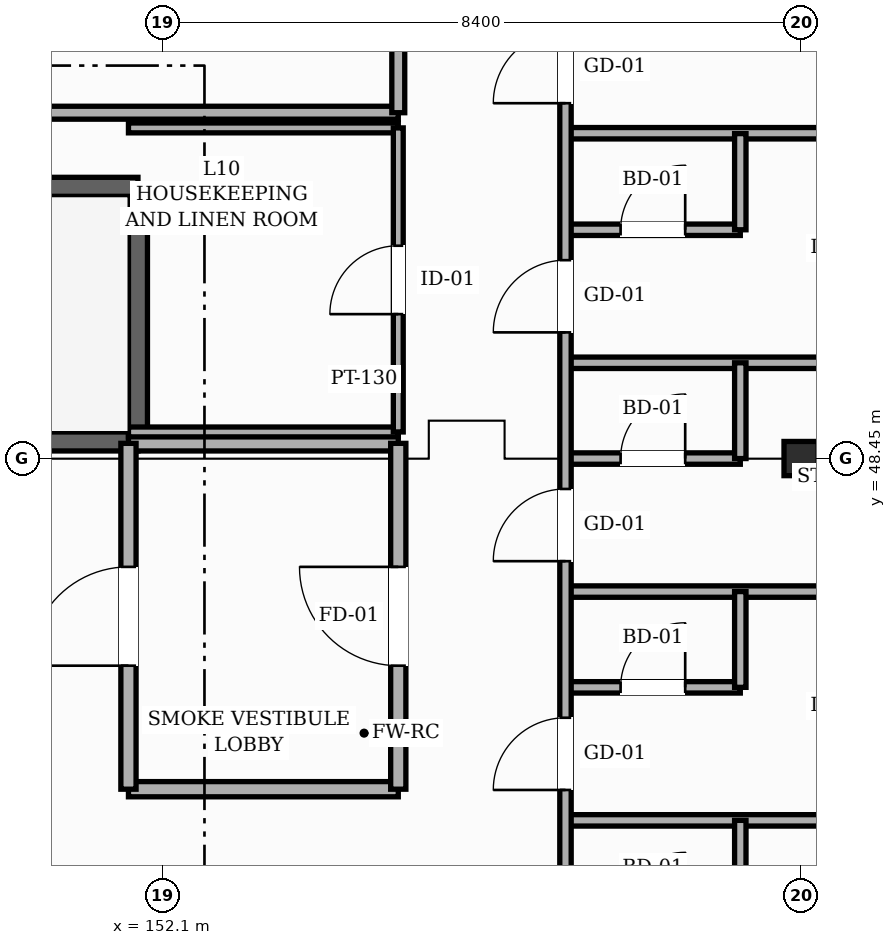
"""IFC4 building model, lengths in metres.
Left out: names, types, materials, properties, quantities, classifications, styles, units other than length and angle.
Written with IfcOpenShell. Run it as: python <this file> out.ifc"""

import sys

from ifc_helpers import new_model, si_unit, direction, frame, frame_2d, origin, origin_2d, place, context, subcontext, project, spatial, rectangle, hollow_rectangle, extrude, element, fill, save


model = new_model("IFC4")
c1 = context("Model", 3, precision=1e-05, world=origin(), true_north=direction((0.0, 1.0)))
c2 = subcontext(c1, "Body", "Model", "MODEL_VIEW")
j1 = project(units=[si_unit("LENGTHUNIT", "METRE"), si_unit("PLANEANGLEUNIT", "RADIAN")], contexts=[c1])
p1 = place(None, origin())
s1 = spatial("IfcSite", under=j1, at=p1, CompositionType="ELEMENT")
p2 = place(p1, origin())
s2 = spatial("IfcBuilding", under=s1, at=p2, CompositionType="ELEMENT")
p3 = place(p2, frame((0.0, 0.0, 42.6)))
s3 = spatial("IfcBuildingStorey", under=s2, at=p3, CompositionType="ELEMENT", Elevation=42.6)
p4 = place(p3, frame((160.5, 48.45, 0.0), z_axis=(0.0, 0.0, 1.0), x_axis=(1.0, 0.0, 0.0)))
e1 = element("IfcColumn", 1, at=p4, inside=s3, PredefinedType="COLUMN", context=c2, shape_type="SweptSolid", body=[
    extrude(hollow_rectangle(XDim=0.45, YDim=0.45, WallThickness=0.019, InnerFilletRadius=0.019, OuterFilletRadius=0.038, at=origin_2d()), origin(), (0.0, 0.0, 1.0), 3.6),
])
p5 = place(p3, frame((151.775, 52.025, 0.0), z_axis=(0.0, 0.0, 1.0), x_axis=(0.0, -1.0, 0.0)))
e2 = element("IfcWall", 2, at=p5, inside=s3, PredefinedType="SHEAR", context=c2, shape_type="SweptSolid", body=[
    extrude(rectangle(XDim=3.35, YDim=0.25, at=frame_2d((1.675, 0.0))), origin(), (0.0, 0.0, 1.0), 3.38),
])
p6 = place(p3, frame((151.775, 48.675, 0.0), z_axis=(0.0, 0.0, 1.0), x_axis=(-1.0, 0.0, 0.0)))
e3 = element("IfcWall", 3, at=p6, inside=s3, PredefinedType="SHEAR", context=c2, shape_type="SweptSolid", body=[
    extrude(rectangle(XDim=7.9, YDim=0.25, at=frame_2d((3.95, 0.0))), origin(), (0.0, 0.0, 1.0), 3.38),
])
p7 = place(p6, frame((6.075, 0.0, 0.0)))
e4 = element("IfcOpeningElement", 4, at=p7, cuts=e3, PredefinedType="OPENING", context=c2, shape_type="SweptSolid", body=[
    extrude(rectangle(XDim=1.3, YDim=2.2, at=frame_2d((0.65, 1.1))), frame((0.0, 0.135, 0.0), z_axis=(0.0, -1.0, 0.0), x_axis=(1.0, 0.0, 0.0)), (0.0, 0.0, 1.0), 0.27),
])
p8 = place(p3, frame((143.875, 52.025, 0.0), z_axis=(0.0, 0.0, 1.0), x_axis=(1.0, 0.0, 0.0)))
e5 = element("IfcWall", 5, at=p8, inside=s3, PredefinedType="SHEAR", context=c2, shape_type="SweptSolid", body=[
    extrude(rectangle(XDim=7.9, YDim=0.25, at=frame_2d((3.95, 0.0))), origin(), (0.0, 0.0, 1.0), 3.38),
])
p9 = place(p3, frame((157.4, 43.69, 0.0), z_axis=(0.0, 0.0, 1.0), x_axis=(1.0, 0.0, 0.0)))
e6 = element("IfcWall", 6, at=p9, inside=s3, PredefinedType="PARTITIONING", context=c2, shape_type="SweptSolid", body=[
    extrude(rectangle(XDim=9.8, YDim=0.15, at=frame_2d((4.9, 0.0))), origin(), (0.0, 0.0, 1.0), 3.365),
])
p10 = place(p3, frame((151.65, 44.1, 0.0), z_axis=(0.0, 0.0, 1.0), x_axis=(1.0, 0.0, 0.0)))
e7 = element("IfcWall", 7, at=p10, inside=s3, PredefinedType="SOLIDWALL", context=c2, shape_type="SweptSolid", body=[
    extrude(rectangle(XDim=3.55, YDim=0.2, at=frame_2d((1.775, 0.0))), origin(), (0.0, 0.0, 1.0), 3.365),
])
p11 = place(p3, frame((157.4, 45.44, 0.0), z_axis=(0.0, 0.0, 1.0), x_axis=(1.0, 0.0, 0.0)))
e8 = element("IfcWall", 8, at=p11, inside=s3, PredefinedType="PARTITIONING", context=c2, shape_type="SweptSolid", body=[
    extrude(rectangle(XDim=2.3, YDim=0.15, at=frame_2d((1.15, 0.0))), origin(), (0.0, 0.0, 1.0), 3.365),
])
p12 = place(p11, frame((0.725, 0.0, 0.0)))
e9 = element("IfcOpeningElement", 9, at=p12, cuts=e8, PredefinedType="OPENING", context=c2, shape_type="SweptSolid", body=[
    extrude(rectangle(XDim=0.85, YDim=2.1, at=frame_2d((0.425, 1.05))), frame((0.0, 0.085, 0.0), z_axis=(0.0, -1.0, 0.0), x_axis=(1.0, 0.0, 0.0)), (0.0, 0.0, 1.0), 0.17),
])
p13 = place(p3, frame((157.4, 46.7, 0.0), z_axis=(0.0, 0.0, 1.0), x_axis=(1.0, 0.0, 0.0)))
e10 = element("IfcWall", 10, at=p13, inside=s3, PredefinedType="PARTITIONING", context=c2, shape_type="SweptSolid", body=[
    extrude(rectangle(XDim=9.8, YDim=0.15, at=frame_2d((4.9, 0.0))), origin(), (0.0, 0.0, 1.0), 3.365),
])
p14 = place(p3, frame((157.4, 48.45, 0.0), z_axis=(0.0, 0.0, 1.0), x_axis=(1.0, 0.0, 0.0)))
e11 = element("IfcWall", 11, at=p14, inside=s3, PredefinedType="PARTITIONING", context=c2, shape_type="SweptSolid", body=[
    extrude(rectangle(XDim=2.3, YDim=0.15, at=frame_2d((1.15, 0.0))), origin(), (0.0, 0.0, 1.0), 3.365),
])
p15 = place(p14, frame((0.725, 0.0, 0.0)))
e12 = element("IfcOpeningElement", 12, at=p15, cuts=e11, PredefinedType="OPENING", context=c2, shape_type="SweptSolid", body=[
    extrude(rectangle(XDim=0.85, YDim=2.1, at=frame_2d((0.425, 1.05))), frame((0.0, 0.085, 0.0), z_axis=(0.0, -1.0, 0.0), x_axis=(1.0, 0.0, 0.0)), (0.0, 0.0, 1.0), 0.17),
])
p16 = place(p3, frame((151.65, 48.65, 0.0), z_axis=(0.0, 0.0, 1.0), x_axis=(1.0, 0.0, 0.0)))
e13 = element("IfcWall", 13, at=p16, inside=s3, PredefinedType="SOLIDWALL", context=c2, shape_type="SweptSolid", body=[
    extrude(rectangle(XDim=3.55, YDim=0.2, at=frame_2d((1.775, 0.0))), origin(), (0.0, 0.0, 1.0), 3.365),
])
p17 = place(p3, frame((151.65, 48.8, 0.0), z_axis=(0.0, 0.0, 1.0), x_axis=(1.0, 0.0, 0.0)))
e14 = element("IfcWall", 14, at=p17, inside=s3, PredefinedType="PARTITIONING", context=c2, shape_type="SweptSolid", body=[
    extrude(rectangle(XDim=3.55, YDim=0.13, at=frame_2d((1.775, 0.0))), origin(), (0.0, 0.0, 1.0), 3.365),
])
p18 = place(p3, frame((157.4, 49.71, 0.0), z_axis=(0.0, 0.0, 1.0), x_axis=(1.0, 0.0, 0.0)))
e15 = element("IfcWall", 15, at=p18, inside=s3, PredefinedType="PARTITIONING", context=c2, shape_type="SweptSolid", body=[
    extrude(rectangle(XDim=9.8, YDim=0.15, at=frame_2d((4.9, 0.0))), origin(), (0.0, 0.0, 1.0), 3.365),
])
p19 = place(p3, frame((157.4, 51.46, 0.0), z_axis=(0.0, 0.0, 1.0), x_axis=(1.0, 0.0, 0.0)))
e16 = element("IfcWall", 16, at=p19, inside=s3, PredefinedType="PARTITIONING", context=c2, shape_type="SweptSolid", body=[
    extrude(rectangle(XDim=2.3, YDim=0.15, at=frame_2d((1.15, 0.0))), origin(), (0.0, 0.0, 1.0), 3.365),
])
p20 = place(p19, frame((0.725, 0.0, 0.0)))
e17 = element("IfcOpeningElement", 17, at=p20, cuts=e16, PredefinedType="OPENING", context=c2, shape_type="SweptSolid", body=[
    extrude(rectangle(XDim=0.85, YDim=2.1, at=frame_2d((0.425, 1.05))), frame((0.0, 0.085, 0.0), z_axis=(0.0, -1.0, 0.0), x_axis=(1.0, 0.0, 0.0)), (0.0, 0.0, 1.0), 0.17),
])
p21 = place(p3, frame((157.4, 52.73, 0.0), z_axis=(0.0, 0.0, 1.0), x_axis=(1.0, 0.0, 0.0)))
e18 = element("IfcWall", 18, at=p21, inside=s3, PredefinedType="PARTITIONING", context=c2, shape_type="SweptSolid", body=[
    extrude(rectangle(XDim=9.8, YDim=0.15, at=frame_2d((4.9, 0.0))), origin(), (0.0, 0.0, 1.0), 3.105),
])
p22 = place(p3, frame((151.65, 52.8, 0.0), z_axis=(0.0, 0.0, 1.0), x_axis=(1.0, 0.0, 0.0)))
e19 = element("IfcWall", 19, at=p22, inside=s3, PredefinedType="PARTITIONING", context=c2, shape_type="SweptSolid", body=[
    extrude(rectangle(XDim=3.55, YDim=0.13, at=frame_2d((1.775, 0.0))), origin(), (0.0, 0.0, 1.0), 3.365),
])
p23 = place(p3, frame((144.8, 53.0, 0.0), z_axis=(0.0, 0.0, 1.0), x_axis=(1.0, 0.0, 0.0)))
e20 = element("IfcWall", 20, at=p23, inside=s3, PredefinedType="PARTITIONING", context=c2, shape_type="SweptSolid", body=[
    extrude(rectangle(XDim=10.4, YDim=0.17, at=frame_2d((5.2, 0.0))), origin(), (0.0, 0.0, 1.0), 3.365),
])
p24 = place(p3, frame((151.65, 44.1, 0.0), z_axis=(0.0, 0.0, 1.0), x_axis=(0.0, 1.0, 0.0)))
e21 = element("IfcWall", 21, at=p24, inside=s3, PredefinedType="SOLIDWALL", context=c2, shape_type="SweptSolid", body=[
    extrude(rectangle(XDim=4.55, YDim=0.2, at=frame_2d((2.275, 0.0))), origin(), (0.0, 0.0, 1.0), 3.365),
])
p25 = place(p24, frame((1.625, 0.0, 0.0)))
e22 = element("IfcOpeningElement", 22, at=p25, cuts=e21, PredefinedType="OPENING", context=c2, shape_type="SweptSolid", body=[
    extrude(rectangle(XDim=1.3, YDim=2.2, at=frame_2d((0.65, 1.1))), frame((0.0, 0.11, 0.0), z_axis=(0.0, -1.0, 0.0), x_axis=(1.0, 0.0, 0.0)), (0.0, 0.0, 1.0), 0.22),
])
p26 = place(p3, frame((155.2, 44.1, 0.0), z_axis=(0.0, 0.0, 1.0), x_axis=(0.0, 1.0, 0.0)))
e23 = element("IfcWall", 23, at=p26, inside=s3, PredefinedType="SOLIDWALL", context=c2, shape_type="SweptSolid", body=[
    extrude(rectangle(XDim=4.55, YDim=0.2, at=frame_2d((2.275, 0.0))), origin(), (0.0, 0.0, 1.0), 3.365),
])
p27 = place(p26, frame((1.625, 0.0, 0.0)))
e24 = element("IfcOpeningElement", 24, at=p27, cuts=e23, PredefinedType="OPENING", context=c2, shape_type="SweptSolid", body=[
    extrude(rectangle(XDim=1.3, YDim=2.2, at=frame_2d((0.65, 1.1))), frame((0.0, 0.11, 0.0), z_axis=(0.0, -1.0, 0.0), x_axis=(1.0, 0.0, 0.0)), (0.0, 0.0, 1.0), 0.22),
])
p28 = place(p3, frame((155.2, 48.8, 0.0), z_axis=(0.0, 0.0, 1.0), x_axis=(0.0, 1.0, 0.0)))
e25 = element("IfcWall", 25, at=p28, inside=s3, PredefinedType="PARTITIONING", context=c2, shape_type="SweptSolid", body=[
    extrude(rectangle(XDim=4.0, YDim=0.13, at=frame_2d((2.0, 0.0))), origin(), (0.0, 0.0, 1.0), 3.365),
])
p29 = place(p28, frame((1.55, 0.0, 0.0)))
e26 = element("IfcOpeningElement", 26, at=p29, cuts=e25, PredefinedType="OPENING", context=c2, shape_type="SweptSolid", body=[
    extrude(rectangle(XDim=0.9, YDim=2.15, at=frame_2d((0.45, 1.075))), frame((0.0, 0.075, 0.0), z_axis=(0.0, -1.0, 0.0), x_axis=(1.0, 0.0, 0.0)), (0.0, 0.0, 1.0), 0.15),
])
p30 = place(p3, frame((155.2, 53.0, 0.0), z_axis=(0.0, 0.0, 1.0), x_axis=(0.0, 1.0, 0.0)))
e27 = element("IfcWall", 27, at=p30, inside=s3, PredefinedType="PARTITIONING", context=c2, shape_type="SweptSolid", body=[
    extrude(rectangle(XDim=6.45, YDim=0.17, at=frame_2d((3.225, 0.0))), origin(), (0.0, 0.0, 1.0), 3.365),
])
p31 = place(p30, frame((2.625, 0.0, 0.0)))
e28 = element("IfcOpeningElement", 28, at=p31, cuts=e27, PredefinedType="OPENING", context=c2, shape_type="SweptSolid", body=[
    extrude(rectangle(XDim=1.2, YDim=2.2, at=frame_2d((0.6, 1.1))), frame((0.0, 0.095, 0.0), z_axis=(0.0, -1.0, 0.0), x_axis=(1.0, 0.0, 0.0)), (0.0, 0.0, 1.0), 0.19),
])
p32 = place(p3, frame((157.4, 22.6, 0.0), z_axis=(0.0, 0.0, 1.0), x_axis=(0.0, 1.0, 0.0)))
e29 = element("IfcWall", 29, at=p32, inside=s3, PredefinedType="PARTITIONING", context=c2, shape_type="SweptSolid", body=[
    extrude(rectangle(XDim=48.2, YDim=0.15, at=frame_2d((24.1, 0.0))), origin(), (0.0, 0.0, 1.0), 3.365),
])
p33 = place(p32, frame((0.325, 0.0, 0.0)))
e30 = element("IfcOpeningElement", 30, at=p33, cuts=e29, PredefinedType="OPENING", context=c2, shape_type="SweptSolid", body=[
    extrude(rectangle(XDim=1.1, YDim=2.2, at=frame_2d((0.55, 1.1))), frame((0.0, 0.085, 0.0), z_axis=(0.0, -1.0, 0.0), x_axis=(1.0, 0.0, 0.0)), (0.0, 0.0, 1.0), 0.17),
])
p34 = place(p32, frame((3.41, 0.0, 0.0)))
e31 = element("IfcOpeningElement", 31, at=p34, cuts=e29, PredefinedType="OPENING", context=c2, shape_type="SweptSolid", body=[
    extrude(rectangle(XDim=0.95, YDim=2.15, at=frame_2d((0.475, 1.075))), frame((0.0, 0.085, 0.0), z_axis=(0.0, -1.0, 0.0), x_axis=(1.0, 0.0, 0.0)), (0.0, 0.0, 1.0), 0.17),
])
p35 = place(p32, frame((6.425, 0.0, 0.0)))
e32 = element("IfcOpeningElement", 32, at=p35, cuts=e29, PredefinedType="OPENING", context=c2, shape_type="SweptSolid", body=[
    extrude(rectangle(XDim=0.95, YDim=2.15, at=frame_2d((0.475, 1.075))), frame((0.0, 0.085, 0.0), z_axis=(0.0, -1.0, 0.0), x_axis=(1.0, 0.0, 0.0)), (0.0, 0.0, 1.0), 0.17),
])
p36 = place(p32, frame((9.44, 0.0, 0.0)))
e33 = element("IfcOpeningElement", 33, at=p36, cuts=e29, PredefinedType="OPENING", context=c2, shape_type="SweptSolid", body=[
    extrude(rectangle(XDim=0.95, YDim=2.15, at=frame_2d((0.475, 1.075))), frame((0.0, 0.085, 0.0), z_axis=(0.0, -1.0, 0.0), x_axis=(1.0, 0.0, 0.0)), (0.0, 0.0, 1.0), 0.17),
])
p37 = place(p32, frame((12.45, 0.0, 0.0)))
e34 = element("IfcOpeningElement", 34, at=p37, cuts=e29, PredefinedType="OPENING", context=c2, shape_type="SweptSolid", body=[
    extrude(rectangle(XDim=0.95, YDim=2.15, at=frame_2d((0.475, 1.075))), frame((0.0, 0.085, 0.0), z_axis=(0.0, -1.0, 0.0), x_axis=(1.0, 0.0, 0.0)), (0.0, 0.0, 1.0), 0.17),
])
p38 = place(p32, frame((15.46, 0.0, 0.0)))
e35 = element("IfcOpeningElement", 35, at=p38, cuts=e29, PredefinedType="OPENING", context=c2, shape_type="SweptSolid", body=[
    extrude(rectangle(XDim=0.95, YDim=2.15, at=frame_2d((0.475, 1.075))), frame((0.0, 0.085, 0.0), z_axis=(0.0, -1.0, 0.0), x_axis=(1.0, 0.0, 0.0)), (0.0, 0.0, 1.0), 0.17),
])
p39 = place(p32, frame((18.475, 0.0, 0.0)))
e36 = element("IfcOpeningElement", 36, at=p39, cuts=e29, PredefinedType="OPENING", context=c2, shape_type="SweptSolid", body=[
    extrude(rectangle(XDim=0.95, YDim=2.15, at=frame_2d((0.475, 1.075))), frame((0.0, 0.085, 0.0), z_axis=(0.0, -1.0, 0.0), x_axis=(1.0, 0.0, 0.0)), (0.0, 0.0, 1.0), 0.17),
])
p40 = place(p32, frame((21.49, 0.0, 0.0)))
e37 = element("IfcOpeningElement", 37, at=p40, cuts=e29, PredefinedType="OPENING", context=c2, shape_type="SweptSolid", body=[
    extrude(rectangle(XDim=0.95, YDim=2.15, at=frame_2d((0.475, 1.075))), frame((0.0, 0.085, 0.0), z_axis=(0.0, -1.0, 0.0), x_axis=(1.0, 0.0, 0.0)), (0.0, 0.0, 1.0), 0.17),
])
p41 = place(p32, frame((24.5, 0.0, 0.0)))
e38 = element("IfcOpeningElement", 38, at=p41, cuts=e29, PredefinedType="OPENING", context=c2, shape_type="SweptSolid", body=[
    extrude(rectangle(XDim=0.95, YDim=2.15, at=frame_2d((0.475, 1.075))), frame((0.0, 0.085, 0.0), z_axis=(0.0, -1.0, 0.0), x_axis=(1.0, 0.0, 0.0)), (0.0, 0.0, 1.0), 0.17),
])
p42 = place(p32, frame((27.51, 0.0, 0.0)))
e39 = element("IfcOpeningElement", 39, at=p42, cuts=e29, PredefinedType="OPENING", context=c2, shape_type="SweptSolid", body=[
    extrude(rectangle(XDim=0.95, YDim=2.15, at=frame_2d((0.475, 1.075))), frame((0.0, 0.085, 0.0), z_axis=(0.0, -1.0, 0.0), x_axis=(1.0, 0.0, 0.0)), (0.0, 0.0, 1.0), 0.17),
])
p43 = place(p32, frame((30.525, 0.0, 0.0)))
e40 = element("IfcOpeningElement", 40, at=p43, cuts=e29, PredefinedType="OPENING", context=c2, shape_type="SweptSolid", body=[
    extrude(rectangle(XDim=0.95, YDim=2.15, at=frame_2d((0.475, 1.075))), frame((0.0, 0.085, 0.0), z_axis=(0.0, -1.0, 0.0), x_axis=(1.0, 0.0, 0.0)), (0.0, 0.0, 1.0), 0.17),
])
p44 = place(p32, frame((33.54, 0.0, 0.0)))
e41 = element("IfcOpeningElement", 41, at=p44, cuts=e29, PredefinedType="OPENING", context=c2, shape_type="SweptSolid", body=[
    extrude(rectangle(XDim=0.95, YDim=2.15, at=frame_2d((0.475, 1.075))), frame((0.0, 0.085, 0.0), z_axis=(0.0, -1.0, 0.0), x_axis=(1.0, 0.0, 0.0)), (0.0, 0.0, 1.0), 0.17),
])
p45 = place(p32, frame((36.55, 0.0, 0.0)))
e42 = element("IfcOpeningElement", 42, at=p45, cuts=e29, PredefinedType="OPENING", context=c2, shape_type="SweptSolid", body=[
    extrude(rectangle(XDim=0.95, YDim=2.15, at=frame_2d((0.475, 1.075))), frame((0.0, 0.085, 0.0), z_axis=(0.0, -1.0, 0.0), x_axis=(1.0, 0.0, 0.0)), (0.0, 0.0, 1.0), 0.17),
])
p46 = place(p32, frame((39.56, 0.0, 0.0)))
e43 = element("IfcOpeningElement", 43, at=p46, cuts=e29, PredefinedType="OPENING", context=c2, shape_type="SweptSolid", body=[
    extrude(rectangle(XDim=0.95, YDim=2.15, at=frame_2d((0.475, 1.075))), frame((0.0, 0.085, 0.0), z_axis=(0.0, -1.0, 0.0), x_axis=(1.0, 0.0, 0.0)), (0.0, 0.0, 1.0), 0.17),
])
p47 = place(p32, frame((42.575, 0.0, 0.0)))
e44 = element("IfcOpeningElement", 44, at=p47, cuts=e29, PredefinedType="OPENING", context=c2, shape_type="SweptSolid", body=[
    extrude(rectangle(XDim=0.95, YDim=2.15, at=frame_2d((0.475, 1.075))), frame((0.0, 0.085, 0.0), z_axis=(0.0, -1.0, 0.0), x_axis=(1.0, 0.0, 0.0)), (0.0, 0.0, 1.0), 0.17),
])
p48 = place(p32, frame((45.585, 0.0, 0.0)))
e45 = element("IfcOpeningElement", 45, at=p48, cuts=e29, PredefinedType="OPENING", context=c2, shape_type="SweptSolid", body=[
    extrude(rectangle(XDim=0.95, YDim=2.15, at=frame_2d((0.475, 1.075))), frame((0.0, 0.085, 0.0), z_axis=(0.0, -1.0, 0.0), x_axis=(1.0, 0.0, 0.0)), (0.0, 0.0, 1.0), 0.17),
])
p49 = place(p3, frame((159.7, 42.425, 0.0), z_axis=(0.0, 0.0, 1.0), x_axis=(0.0, 1.0, 0.0)))
e46 = element("IfcWall", 46, at=p49, inside=s3, PredefinedType="PARTITIONING", context=c2, shape_type="SweptSolid", body=[
    extrude(rectangle(XDim=1.265, YDim=0.15, at=frame_2d((0.632, 0.0))), origin(), (0.0, 0.0, 1.0), 3.365),
])
for number, where, z_axis, x_axis in (
    (47, (159.7, 45.44, 0.0), (0.0, 0.0, 1.0), (0.0, 1.0, 0.0)),
    (48, (159.7, 48.45, 0.0), (0.0, 0.0, 1.0), (0.0, 1.0, 0.0)),
):
    element("IfcWall", number, at=place(p3, frame(where, z_axis=z_axis, x_axis=x_axis)), inside=s3, PredefinedType="PARTITIONING", context=c2, shape_type="SweptSolid", body=[
        extrude(rectangle(XDim=1.26, YDim=0.15, at=frame_2d((0.63, 0.0))), origin(), (0.0, 0.0, 1.0), 3.365),
    ])
p50 = place(p3, frame((159.7, 51.46, 0.0), z_axis=(0.0, 0.0, 1.0), x_axis=(0.0, 1.0, 0.0)))
e49 = element("IfcWall", 49, at=p50, inside=s3, PredefinedType="PARTITIONING", context=c2, shape_type="SweptSolid", body=[
    extrude(rectangle(XDim=1.265, YDim=0.15, at=frame_2d((0.633, 0.0))), origin(), (0.0, 0.0, 1.0), 3.365),
])
p51 = place(p25, origin())
e50 = element("IfcDoor", 50, at=p51, inside=s3, OperationType="SINGLE_SWING_LEFT", PredefinedType="DOOR", context=c2, shape_type="SweptSolid", body=[
    extrude(rectangle(XDim=1.3, YDim=2.2, at=frame_2d((0.65, 1.1))), frame((0.0, 0.025, 0.0), z_axis=(0.0, -1.0, 0.0), x_axis=(1.0, 0.0, 0.0)), (0.0, 0.0, 1.0), 0.05),
])
fill(e22, e50)
p52 = place(p27, origin())
e51 = element("IfcDoor", 51, at=p52, inside=s3, OperationType="SINGLE_SWING_RIGHT", PredefinedType="DOOR", context=c2, shape_type="SweptSolid", body=[
    extrude(rectangle(XDim=1.3, YDim=2.2, at=frame_2d((0.65, 1.1))), frame((0.0, 0.025, 0.0), z_axis=(0.0, -1.0, 0.0), x_axis=(1.0, 0.0, 0.0)), (0.0, 0.0, 1.0), 0.05),
])
fill(e24, e51)
p53 = place(p29, origin())
e52 = element("IfcDoor", 52, at=p53, inside=s3, OperationType="SINGLE_SWING_LEFT", PredefinedType="DOOR", context=c2, shape_type="SweptSolid", body=[
    extrude(rectangle(XDim=0.9, YDim=2.15, at=frame_2d((0.45, 1.075))), frame((0.0, 0.025, 0.0), z_axis=(0.0, -1.0, 0.0), x_axis=(1.0, 0.0, 0.0)), (0.0, 0.0, 1.0), 0.05),
])
fill(e26, e52)
p54 = place(p40, origin())
e53 = element("IfcDoor", 53, at=p54, inside=s3, OperationType="SINGLE_SWING_LEFT", PredefinedType="DOOR", context=c2, shape_type="SweptSolid", body=[
    extrude(rectangle(XDim=0.95, YDim=2.15, at=frame_2d((0.475, 1.075))), frame((0.0, 0.025, 0.0), z_axis=(0.0, -1.0, 0.0), x_axis=(1.0, 0.0, 0.0)), (0.0, 0.0, 1.0), 0.05),
])
fill(e37, e53)
p55 = place(p12, origin())
e54 = element("IfcDoor", 54, at=p55, inside=s3, OperationType="SINGLE_SWING_RIGHT", PredefinedType="DOOR", context=c2, shape_type="SweptSolid", body=[
    extrude(rectangle(XDim=0.85, YDim=2.1, at=frame_2d((0.425, 1.05))), frame((0.0, 0.025, 0.0), z_axis=(0.0, -1.0, 0.0), x_axis=(1.0, 0.0, 0.0)), (0.0, 0.0, 1.0), 0.05),
])
fill(e9, e54)
p56 = place(p41, origin())
e55 = element("IfcDoor", 55, at=p56, inside=s3, OperationType="SINGLE_SWING_LEFT", PredefinedType="DOOR", context=c2, shape_type="SweptSolid", body=[
    extrude(rectangle(XDim=0.95, YDim=2.15, at=frame_2d((0.475, 1.075))), frame((0.0, 0.025, 0.0), z_axis=(0.0, -1.0, 0.0), x_axis=(1.0, 0.0, 0.0)), (0.0, 0.0, 1.0), 0.05),
])
fill(e38, e55)
p57 = place(p15, origin())
e56 = element("IfcDoor", 56, at=p57, inside=s3, OperationType="SINGLE_SWING_RIGHT", PredefinedType="DOOR", context=c2, shape_type="SweptSolid", body=[
    extrude(rectangle(XDim=0.85, YDim=2.1, at=frame_2d((0.425, 1.05))), frame((0.0, 0.025, 0.0), z_axis=(0.0, -1.0, 0.0), x_axis=(1.0, 0.0, 0.0)), (0.0, 0.0, 1.0), 0.05),
])
fill(e12, e56)
p58 = place(p42, origin())
e57 = element("IfcDoor", 57, at=p58, inside=s3, OperationType="SINGLE_SWING_LEFT", PredefinedType="DOOR", context=c2, shape_type="SweptSolid", body=[
    extrude(rectangle(XDim=0.95, YDim=2.15, at=frame_2d((0.475, 1.075))), frame((0.0, 0.025, 0.0), z_axis=(0.0, -1.0, 0.0), x_axis=(1.0, 0.0, 0.0)), (0.0, 0.0, 1.0), 0.05),
])
fill(e39, e57)
p59 = place(p20, origin())
e58 = element("IfcDoor", 58, at=p59, inside=s3, OperationType="SINGLE_SWING_RIGHT", PredefinedType="DOOR", context=c2, shape_type="SweptSolid", body=[
    extrude(rectangle(XDim=0.85, YDim=2.1, at=frame_2d((0.425, 1.05))), frame((0.0, 0.025, 0.0), z_axis=(0.0, -1.0, 0.0), x_axis=(1.0, 0.0, 0.0)), (0.0, 0.0, 1.0), 0.05),
])
fill(e17, e58)
p60 = place(p43, origin())
e59 = element("IfcDoor", 59, at=p60, inside=s3, OperationType="SINGLE_SWING_LEFT", PredefinedType="DOOR", context=c2, shape_type="SweptSolid", body=[
    extrude(rectangle(XDim=0.95, YDim=2.15, at=frame_2d((0.475, 1.075))), frame((0.0, 0.025, 0.0), z_axis=(0.0, -1.0, 0.0), x_axis=(1.0, 0.0, 0.0)), (0.0, 0.0, 1.0), 0.05),
])
fill(e40, e59)
save(model, sys.argv[1])
